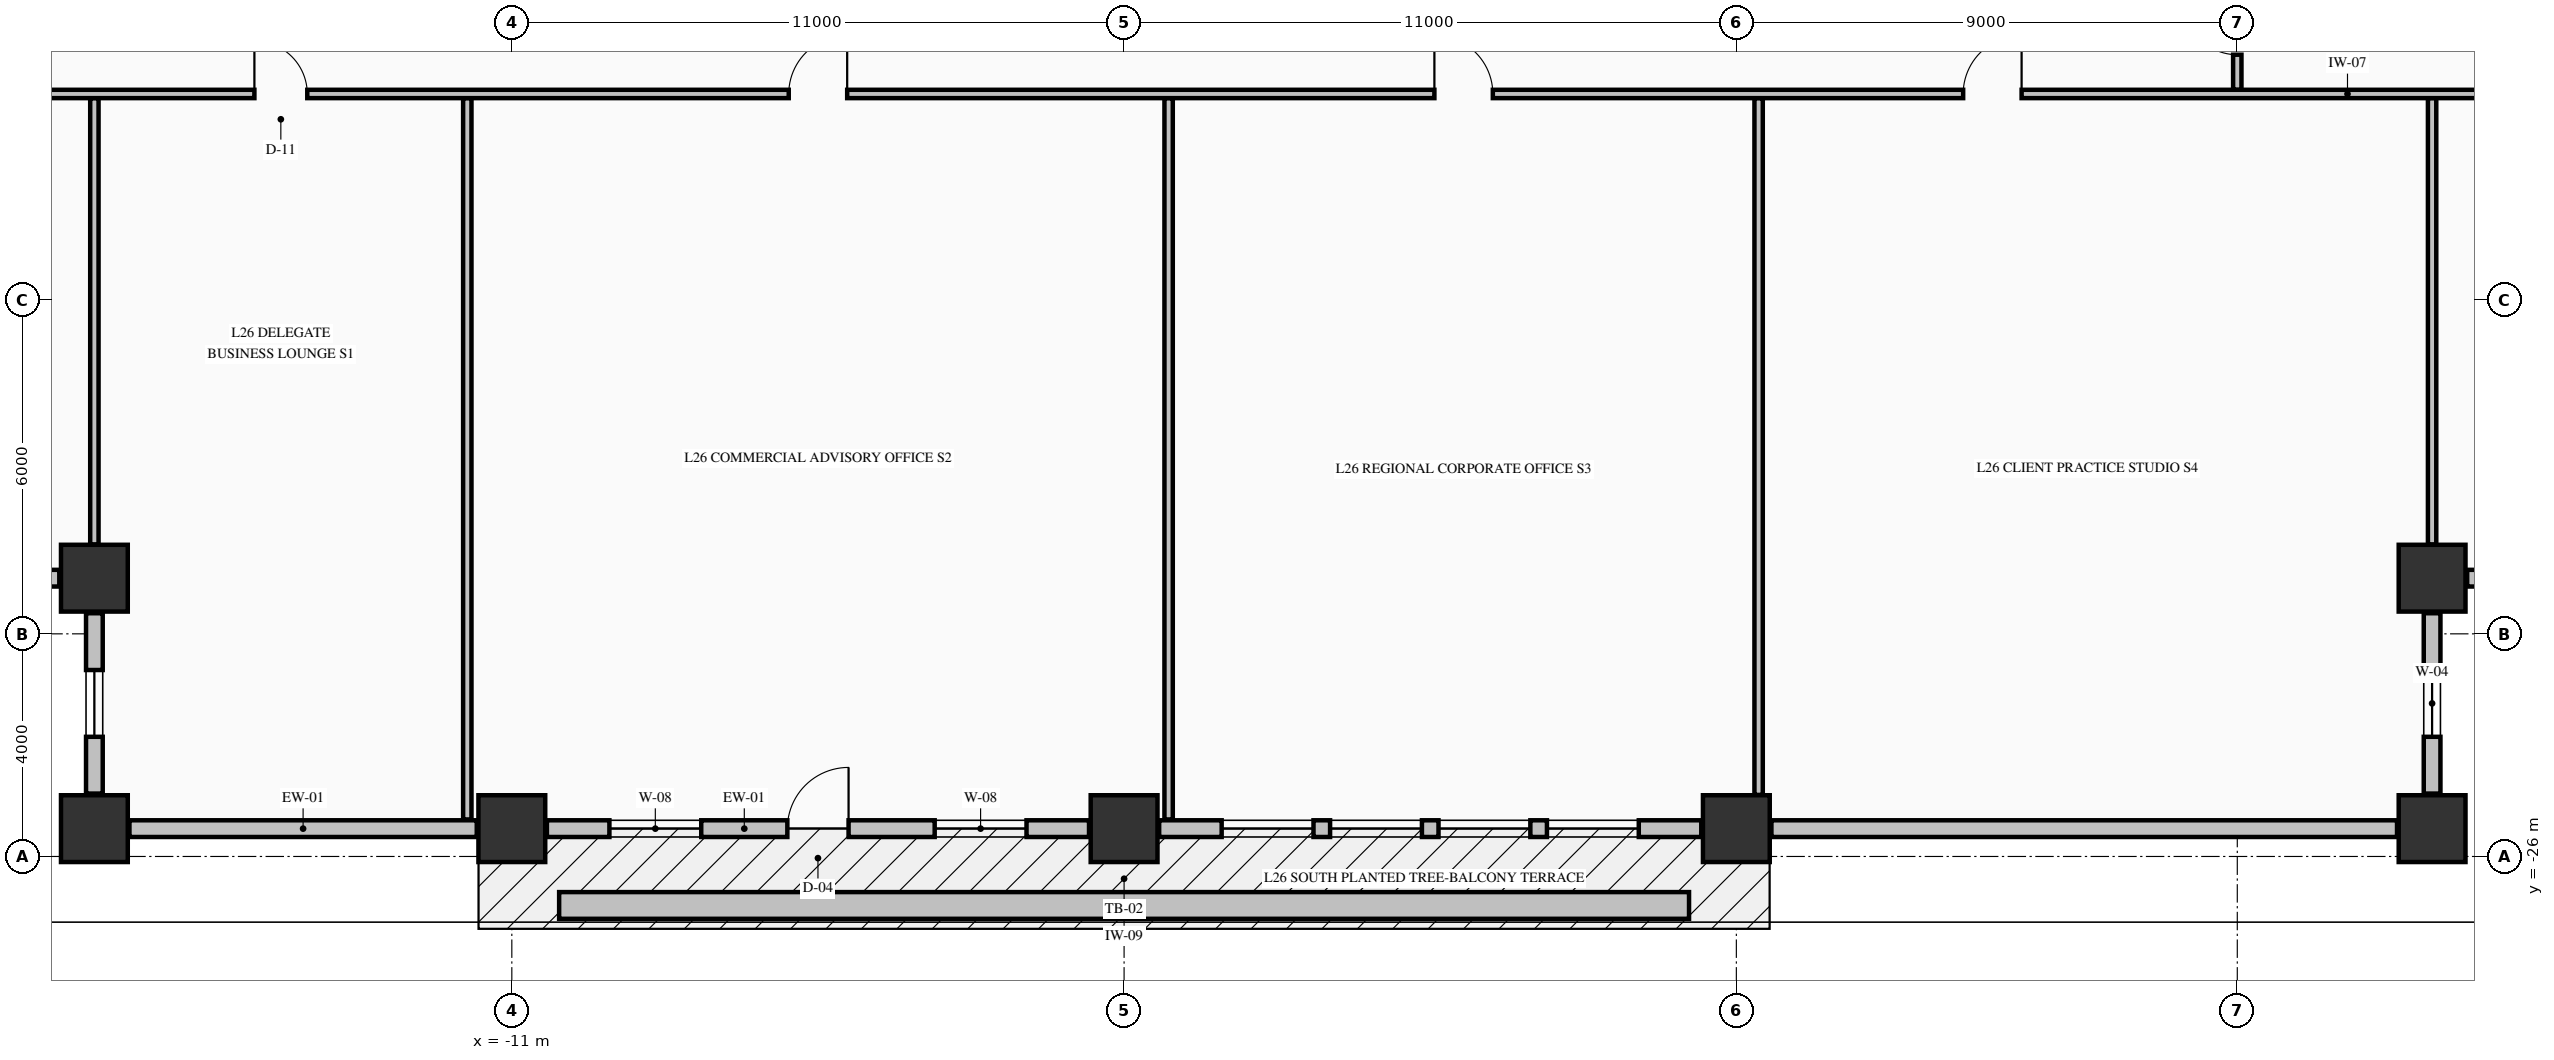
"""IFC4 building model, lengths in metres.
Left out: names, types, materials, properties, quantities, classifications, styles, units other than length and angle.
Written with IfcOpenShell. Run it as: python <this file> out.ifc"""

import sys

from ifc_helpers import new_model, si_unit, direction, frame, frame_2d, origin, origin_2d, place, context, subcontext, project, spatial, rectangle, extrude, element, fill, save


model = new_model("IFC4")
c1 = context("Model", 3, precision=1e-05, world=origin(), true_north=direction((0.0, 1.0)))
c2 = subcontext(c1, "Body", "Model", "MODEL_VIEW")
j1 = project(units=[si_unit("LENGTHUNIT", "METRE"), si_unit("PLANEANGLEUNIT", "RADIAN")], contexts=[c1])
p1 = place(None, origin())
s1 = spatial("IfcSite", under=j1, at=p1, CompositionType="ELEMENT")
p2 = place(p1, origin())
s2 = spatial("IfcBuilding", under=s1, at=p2, CompositionType="ELEMENT")
p3 = place(p2, frame((0.0, 0.0, 105.64)))
s3 = spatial("IfcBuildingStorey", under=s2, at=p3, CompositionType="ELEMENT", Elevation=105.64)
for number, where, z_axis, x_axis in (
    (1, (-18.5, -25.5, -0.25), (0.0, 0.0, 1.0), (1.0, 0.0, 0.0)),
    (2, (-11.0, -25.5, -0.25), (0.0, 0.0, 1.0), (1.0, 0.0, 0.0)),
    (3, (0.0, -25.5, -0.25), (0.0, 0.0, 1.0), (1.0, 0.0, 0.0)),
    (4, (11.0, -25.5, -0.25), (0.0, 0.0, 1.0), (1.0, 0.0, 0.0)),
    (5, (23.5, -25.5, -0.25), (0.0, 0.0, 1.0), (1.0, 0.0, 0.0)),
    (6, (-18.5, -21.0, -0.25), (0.0, 0.0, 1.0), (1.0, 0.0, 0.0)),
    (7, (23.5, -21.0, -0.25), (0.0, 0.0, 1.0), (1.0, 0.0, 0.0)),
):
    element("IfcColumn", number, at=place(p3, frame(where, z_axis=z_axis, x_axis=x_axis)), inside=s3, PredefinedType="COLUMN", context=c2, shape_type="SweptSolid", body=[
        extrude(rectangle(XDim=1.2, YDim=1.2, at=origin_2d()), origin(), (0.0, 0.0, 1.0), 3.57),
    ])
p4 = place(p3, frame((23.5, -24.87, 0.0), z_axis=(0.0, 0.0, 1.0), x_axis=(0.0, 1.0, 0.0)))
e8 = element("IfcWall", 8, at=p4, inside=s3, PredefinedType="STANDARD", context=c2, shape_type="SweptSolid", body=[
    extrude(rectangle(XDim=3.24, YDim=0.3, at=frame_2d((1.62, 0.0))), origin(), (0.0, 0.0, 1.0), 2.712),
])
p5 = place(p4, frame((1.02, 0.0, 0.82)))
e9 = element("IfcOpeningElement", 9, at=p5, cuts=e8, PredefinedType="OPENING", context=c2, shape_type="SweptSolid", body=[
    extrude(rectangle(XDim=1.2, YDim=1.65, at=frame_2d((0.6, 0.825))), frame((0.0, 0.16, 0.0), z_axis=(0.0, -1.0, 0.0), x_axis=(1.0, 0.0, 0.0)), (0.0, 0.0, 1.0), 0.32),
])
p6 = place(p3, frame((24.13, -21.0, 0.0), z_axis=(0.0, 0.0, 1.0), x_axis=(1.0, 0.0, 0.0)))
e10 = element("IfcWall", 10, at=p6, inside=s3, PredefinedType="STANDARD", context=c2, shape_type="SweptSolid", body=[
    extrude(rectangle(XDim=3.24, YDim=0.3, at=frame_2d((1.62, 0.0))), origin(), (0.0, 0.0, 1.0), 2.712),
])
p7 = place(p6, frame((1.02, 0.0, 0.82)))
e11 = element("IfcOpeningElement", 11, at=p7, cuts=e10, PredefinedType="OPENING", context=c2, shape_type="SweptSolid", body=[
    extrude(rectangle(XDim=1.2, YDim=1.65, at=frame_2d((0.6, 0.825))), frame((0.0, 0.16, 0.0), z_axis=(0.0, -1.0, 0.0), x_axis=(1.0, 0.0, 0.0)), (0.0, 0.0, 1.0), 0.32),
])
p8 = place(p3, frame((-22.37, -21.0, 0.0), z_axis=(0.0, 0.0, 1.0), x_axis=(1.0, 0.0, 0.0)))
e12 = element("IfcWall", 12, at=p8, inside=s3, PredefinedType="STANDARD", context=c2, shape_type="SweptSolid", body=[
    extrude(rectangle(XDim=3.24, YDim=0.3, at=frame_2d((1.62, 0.0))), origin(), (0.0, 0.0, 1.0), 2.712),
])
p9 = place(p8, frame((1.02, 0.0, 0.82)))
e13 = element("IfcOpeningElement", 13, at=p9, cuts=e12, PredefinedType="OPENING", context=c2, shape_type="SweptSolid", body=[
    extrude(rectangle(XDim=1.2, YDim=1.65, at=frame_2d((0.6, 0.825))), frame((0.0, 0.16, 0.0), z_axis=(0.0, -1.0, 0.0), x_axis=(1.0, 0.0, 0.0)), (0.0, 0.0, 1.0), 0.32),
])
p10 = place(p3, frame((-18.5, -21.63, 0.0), z_axis=(0.0, 0.0, 1.0), x_axis=(0.0, -1.0, 0.0)))
e14 = element("IfcWall", 14, at=p10, inside=s3, PredefinedType="STANDARD", context=c2, shape_type="SweptSolid", body=[
    extrude(rectangle(XDim=3.24, YDim=0.3, at=frame_2d((1.62, 0.0))), origin(), (0.0, 0.0, 1.0), 2.712),
])
p11 = place(p10, frame((1.02, 0.0, 0.82)))
e15 = element("IfcOpeningElement", 15, at=p11, cuts=e14, PredefinedType="OPENING", context=c2, shape_type="SweptSolid", body=[
    extrude(rectangle(XDim=1.2, YDim=1.65, at=frame_2d((0.6, 0.825))), frame((0.0, 0.16, 0.0), z_axis=(0.0, -1.0, 0.0), x_axis=(1.0, 0.0, 0.0)), (0.0, 0.0, 1.0), 0.32),
])
p12 = place(p3, frame((-17.87, -25.5, 0.0), z_axis=(0.0, 0.0, 1.0), x_axis=(1.0, 0.0, 0.0)))
e16 = element("IfcWall", 16, at=p12, inside=s3, PredefinedType="STANDARD", context=c2, shape_type="SweptSolid", body=[
    extrude(rectangle(XDim=6.24, YDim=0.3, at=frame_2d((3.12, 0.0))), origin(), (0.0, 0.0, 1.0), 2.712),
])
p13 = place(p3, frame((-10.37, -25.5, 0.0), z_axis=(0.0, 0.0, 1.0), x_axis=(1.0, 0.0, 0.0)))
e17 = element("IfcWall", 17, at=p13, inside=s3, PredefinedType="STANDARD", context=c2, shape_type="SweptSolid", body=[
    extrude(rectangle(XDim=9.74, YDim=0.3, at=frame_2d((4.87, 0.0))), origin(), (0.0, 0.0, 1.0), 2.712),
])
p14 = place(p13, frame((4.32, 0.0, 0.0)))
e18 = element("IfcOpeningElement", 18, at=p14, cuts=e17, PredefinedType="OPENING", context=c2, shape_type="SweptSolid", body=[
    extrude(rectangle(XDim=1.1, YDim=2.15, at=frame_2d((0.55, 1.075))), frame((0.0, 0.16, 0.0), z_axis=(0.0, -1.0, 0.0), x_axis=(1.0, 0.0, 0.0)), (0.0, 0.0, 1.0), 0.32),
])
p15 = place(p13, frame((1.123, 0.0, 0.8)))
e19 = element("IfcOpeningElement", 19, at=p15, cuts=e17, PredefinedType="OPENING", context=c2, shape_type="SweptSolid", body=[
    extrude(rectangle(XDim=1.65, YDim=1.7, at=frame_2d((0.825, 0.85))), frame((0.0, 0.16, 0.0), z_axis=(0.0, -1.0, 0.0), x_axis=(1.0, 0.0, 0.0)), (0.0, 0.0, 1.0), 0.32),
])
p16 = place(p13, frame((6.967, 0.0, 0.8)))
e20 = element("IfcOpeningElement", 20, at=p16, cuts=e17, PredefinedType="OPENING", context=c2, shape_type="SweptSolid", body=[
    extrude(rectangle(XDim=1.65, YDim=1.7, at=frame_2d((0.825, 0.85))), frame((0.0, 0.16, 0.0), z_axis=(0.0, -1.0, 0.0), x_axis=(1.0, 0.0, 0.0)), (0.0, 0.0, 1.0), 0.32),
])
p17 = place(p3, frame((0.63, -25.5, 0.0), z_axis=(0.0, 0.0, 1.0), x_axis=(1.0, 0.0, 0.0)))
e21 = element("IfcWall", 21, at=p17, inside=s3, PredefinedType="STANDARD", context=c2, shape_type="SweptSolid", body=[
    extrude(rectangle(XDim=9.74, YDim=0.3, at=frame_2d((4.87, 0.0))), origin(), (0.0, 0.0, 1.0), 2.712),
])
p18 = place(p17, frame((1.123, 0.0, 0.8)))
e22 = element("IfcOpeningElement", 22, at=p18, cuts=e21, PredefinedType="OPENING", context=c2, shape_type="SweptSolid", body=[
    extrude(rectangle(XDim=1.65, YDim=1.7, at=frame_2d((0.825, 0.85))), frame((0.0, 0.16, 0.0), z_axis=(0.0, -1.0, 0.0), x_axis=(1.0, 0.0, 0.0)), (0.0, 0.0, 1.0), 0.32),
])
p19 = place(p17, frame((3.071, 0.0, 0.8)))
e23 = element("IfcOpeningElement", 23, at=p19, cuts=e21, PredefinedType="OPENING", context=c2, shape_type="SweptSolid", body=[
    extrude(rectangle(XDim=1.65, YDim=1.7, at=frame_2d((0.825, 0.85))), frame((0.0, 0.16, 0.0), z_axis=(0.0, -1.0, 0.0), x_axis=(1.0, 0.0, 0.0)), (0.0, 0.0, 1.0), 0.32),
])
p20 = place(p17, frame((5.019, 0.0, 0.8)))
e24 = element("IfcOpeningElement", 24, at=p20, cuts=e21, PredefinedType="OPENING", context=c2, shape_type="SweptSolid", body=[
    extrude(rectangle(XDim=1.65, YDim=1.7, at=frame_2d((0.825, 0.85))), frame((0.0, 0.16, 0.0), z_axis=(0.0, -1.0, 0.0), x_axis=(1.0, 0.0, 0.0)), (0.0, 0.0, 1.0), 0.32),
])
p21 = place(p17, frame((6.967, 0.0, 0.8)))
e25 = element("IfcOpeningElement", 25, at=p21, cuts=e21, PredefinedType="OPENING", context=c2, shape_type="SweptSolid", body=[
    extrude(rectangle(XDim=1.65, YDim=1.7, at=frame_2d((0.825, 0.85))), frame((0.0, 0.16, 0.0), z_axis=(0.0, -1.0, 0.0), x_axis=(1.0, 0.0, 0.0)), (0.0, 0.0, 1.0), 0.32),
])
p22 = place(p3, frame((11.63, -25.5, 0.0), z_axis=(0.0, 0.0, 1.0), x_axis=(1.0, 0.0, 0.0)))
e26 = element("IfcWall", 26, at=p22, inside=s3, PredefinedType="STANDARD", context=c2, shape_type="SweptSolid", body=[
    extrude(rectangle(XDim=11.24, YDim=0.3, at=frame_2d((5.62, 0.0))), origin(), (0.0, 0.0, 1.0), 2.712),
])
p23 = place(p3, frame((-22.835, -12.3, 0.0), z_axis=(0.0, 0.0, 1.0), x_axis=(1.0, 0.0, 0.0)))
e27 = element("IfcWall", 27, at=p23, inside=s3, PredefinedType="PARTITIONING", context=c2, shape_type="SweptSolid", body=[
    extrude(rectangle(XDim=50.67, YDim=0.15, at=frame_2d((25.335, 0.0))), origin(), (0.0, 0.0, 1.0), 3.32),
])
p24 = place(p23, frame((7.21, 0.0, 0.0)))
e28 = element("IfcOpeningElement", 28, at=p24, cuts=e27, PredefinedType="OPENING", context=c2, shape_type="SweptSolid", body=[
    extrude(rectangle(XDim=0.95, YDim=2.15, at=frame_2d((0.475, 1.075))), frame((0.0, 0.085, 0.0), z_axis=(0.0, -1.0, 0.0), x_axis=(1.0, 0.0, 0.0)), (0.0, 0.0, 1.0), 0.17),
])
p25 = place(p23, frame((16.81, 0.0, 0.0)))
e29 = element("IfcOpeningElement", 29, at=p25, cuts=e27, PredefinedType="OPENING", context=c2, shape_type="SweptSolid", body=[
    extrude(rectangle(XDim=1.05, YDim=2.15, at=frame_2d((0.525, 1.075))), frame((0.0, 0.085, 0.0), z_axis=(0.0, -1.0, 0.0), x_axis=(1.0, 0.0, 0.0)), (0.0, 0.0, 1.0), 0.17),
])
p26 = place(p23, frame((28.41, 0.0, 0.0)))
e30 = element("IfcOpeningElement", 30, at=p26, cuts=e27, PredefinedType="OPENING", context=c2, shape_type="SweptSolid", body=[
    extrude(rectangle(XDim=1.05, YDim=2.15, at=frame_2d((0.525, 1.075))), frame((0.0, 0.085, 0.0), z_axis=(0.0, -1.0, 0.0), x_axis=(1.0, 0.0, 0.0)), (0.0, 0.0, 1.0), 0.17),
])
p27 = place(p23, frame((37.91, 0.0, 0.0)))
e31 = element("IfcOpeningElement", 31, at=p27, cuts=e27, PredefinedType="OPENING", context=c2, shape_type="SweptSolid", body=[
    extrude(rectangle(XDim=1.05, YDim=2.15, at=frame_2d((0.525, 1.075))), frame((0.0, 0.085, 0.0), z_axis=(0.0, -1.0, 0.0), x_axis=(1.0, 0.0, 0.0)), (0.0, 0.0, 1.0), 0.17),
])
p28 = place(p3, frame((-18.5, -20.394, 0.0), z_axis=(0.0, 0.0, 1.0), x_axis=(0.0, 1.0, 0.0)))
e32 = element("IfcWall", 32, at=p28, inside=s3, PredefinedType="PARTITIONING", context=c2, shape_type="SweptSolid", body=[
    extrude(rectangle(XDim=8.016, YDim=0.15, at=frame_2d((4.008, 0.0))), origin(), (0.0, 0.0, 1.0), 3.32),
])
for number, where, z_axis, x_axis in (
    (33, (-11.8, -25.335, 0.0), (0.0, 0.0, 1.0), (0.0, 1.0, 0.0)),
    (34, (0.8, -25.335, 0.0), (0.0, 0.0, 1.0), (0.0, 1.0, 0.0)),
):
    element("IfcWall", number, at=place(p3, frame(where, z_axis=z_axis, x_axis=x_axis)), inside=s3, PredefinedType="PARTITIONING", context=c2, shape_type="SweptSolid", body=[
        extrude(rectangle(XDim=12.957, YDim=0.15, at=frame_2d((6.479, 0.0))), origin(), (0.0, 0.0, 1.0), 3.32),
    ])
p29 = place(p3, frame((11.4, -24.894, 0.0), z_axis=(0.0, 0.0, 1.0), x_axis=(0.0, 1.0, 0.0)))
e35 = element("IfcWall", 35, at=p29, inside=s3, PredefinedType="PARTITIONING", context=c2, shape_type="SweptSolid", body=[
    extrude(rectangle(XDim=12.516, YDim=0.15, at=frame_2d((6.258, 0.0))), origin(), (0.0, 0.0, 1.0), 3.32),
])
p30 = place(p3, frame((20.0, -12.222, 0.0), z_axis=(0.0, 0.0, 1.0), x_axis=(0.0, 1.0, 0.0)))
e36 = element("IfcWall", 36, at=p30, inside=s3, PredefinedType="PARTITIONING", context=c2, shape_type="SweptSolid", body=[
    extrude(rectangle(XDim=1.766, YDim=0.15, at=frame_2d((0.883, 0.0))), origin(), (0.0, 0.0, 1.0), 2.81),
])
p31 = place(p30, frame((0.627, 0.0, 0.0)))
e37 = element("IfcOpeningElement", 37, at=p31, cuts=e36, PredefinedType="OPENING", context=c2, shape_type="SweptSolid", body=[
    extrude(rectangle(XDim=0.95, YDim=2.15, at=frame_2d((0.475, 1.075))), frame((0.0, 0.085, 0.0), z_axis=(0.0, -1.0, 0.0), x_axis=(1.0, 0.0, 0.0)), (0.0, 0.0, 1.0), 0.17),
])
p32 = place(p3, frame((23.5, -20.394, 0.0), z_axis=(0.0, 0.0, 1.0), x_axis=(0.0, 1.0, 0.0)))
e38 = element("IfcWall", 38, at=p32, inside=s3, PredefinedType="PARTITIONING", context=c2, shape_type="SweptSolid", body=[
    extrude(rectangle(XDim=8.016, YDim=0.15, at=frame_2d((4.008, 0.0))), origin(), (0.0, 0.0, 1.0), 3.32),
])
p33 = place(p3, frame((-10.15, -26.88, -0.04), z_axis=(0.0, 0.0, 1.0), x_axis=(1.0, 0.0, 0.0)))
e39 = element("IfcWall", 39, at=p33, inside=s3, PredefinedType="PARAPET", context=c2, shape_type="SweptSolid", body=[
    extrude(rectangle(XDim=20.3, YDim=0.48, at=frame_2d((10.15, 0.0))), origin(), (0.0, 0.0, 1.0), 0.52),
])
p34 = place(p5, origin())
e40 = element("IfcWindow", 40, at=p34, inside=s3, PartitioningType="SINGLE_PANEL", PredefinedType="WINDOW", context=c2, shape_type="SweptSolid", body=[
    extrude(rectangle(XDim=1.2, YDim=1.65, at=frame_2d((0.6, 0.825))), frame((0.0, 0.03, 0.0), z_axis=(0.0, -1.0, 0.0), x_axis=(1.0, 0.0, 0.0)), (0.0, 0.0, 1.0), 0.06),
])
fill(e9, e40)
p35 = place(p11, origin())
e41 = element("IfcWindow", 41, at=p35, inside=s3, PartitioningType="SINGLE_PANEL", PredefinedType="WINDOW", context=c2, shape_type="SweptSolid", body=[
    extrude(rectangle(XDim=1.2, YDim=1.65, at=frame_2d((0.6, 0.825))), frame((0.0, 0.03, 0.0), z_axis=(0.0, -1.0, 0.0), x_axis=(1.0, 0.0, 0.0)), (0.0, 0.0, 1.0), 0.06),
])
fill(e15, e41)
p36 = place(p14, origin())
e42 = element("IfcDoor", 42, at=p36, inside=s3, OperationType="SINGLE_SWING_RIGHT", PredefinedType="DOOR", context=c2, shape_type="SweptSolid", body=[
    extrude(rectangle(XDim=1.1, YDim=2.15, at=frame_2d((0.55, 1.075))), frame((0.0, 0.025, 0.0), z_axis=(0.0, -1.0, 0.0), x_axis=(1.0, 0.0, 0.0)), (0.0, 0.0, 1.0), 0.05),
])
fill(e18, e42)
p37 = place(p15, origin())
e43 = element("IfcWindow", 43, at=p37, inside=s3, PartitioningType="SINGLE_PANEL", PredefinedType="WINDOW", context=c2, shape_type="SweptSolid", body=[
    extrude(rectangle(XDim=1.65, YDim=1.7, at=frame_2d((0.825, 0.85))), frame((0.0, 0.03, 0.0), z_axis=(0.0, -1.0, 0.0), x_axis=(1.0, 0.0, 0.0)), (0.0, 0.0, 1.0), 0.06),
])
fill(e19, e43)
p38 = place(p16, origin())
e44 = element("IfcWindow", 44, at=p38, inside=s3, PartitioningType="SINGLE_PANEL", PredefinedType="WINDOW", context=c2, shape_type="SweptSolid", body=[
    extrude(rectangle(XDim=1.65, YDim=1.7, at=frame_2d((0.825, 0.85))), frame((0.0, 0.03, 0.0), z_axis=(0.0, -1.0, 0.0), x_axis=(1.0, 0.0, 0.0)), (0.0, 0.0, 1.0), 0.06),
])
fill(e20, e44)
p39 = place(p18, origin())
e45 = element("IfcWindow", 45, at=p39, inside=s3, PartitioningType="SINGLE_PANEL", PredefinedType="WINDOW", context=c2, shape_type="SweptSolid", body=[
    extrude(rectangle(XDim=1.65, YDim=1.7, at=frame_2d((0.825, 0.85))), frame((0.0, 0.03, 0.0), z_axis=(0.0, -1.0, 0.0), x_axis=(1.0, 0.0, 0.0)), (0.0, 0.0, 1.0), 0.06),
])
fill(e22, e45)
p40 = place(p19, origin())
e46 = element("IfcWindow", 46, at=p40, inside=s3, PartitioningType="SINGLE_PANEL", PredefinedType="WINDOW", context=c2, shape_type="SweptSolid", body=[
    extrude(rectangle(XDim=1.65, YDim=1.7, at=frame_2d((0.825, 0.85))), frame((0.0, 0.03, 0.0), z_axis=(0.0, -1.0, 0.0), x_axis=(1.0, 0.0, 0.0)), (0.0, 0.0, 1.0), 0.06),
])
fill(e23, e46)
p41 = place(p20, origin())
e47 = element("IfcWindow", 47, at=p41, inside=s3, PartitioningType="SINGLE_PANEL", PredefinedType="WINDOW", context=c2, shape_type="SweptSolid", body=[
    extrude(rectangle(XDim=1.65, YDim=1.7, at=frame_2d((0.825, 0.85))), frame((0.0, 0.03, 0.0), z_axis=(0.0, -1.0, 0.0), x_axis=(1.0, 0.0, 0.0)), (0.0, 0.0, 1.0), 0.06),
])
fill(e24, e47)
p42 = place(p21, origin())
e48 = element("IfcWindow", 48, at=p42, inside=s3, PartitioningType="SINGLE_PANEL", PredefinedType="WINDOW", context=c2, shape_type="SweptSolid", body=[
    extrude(rectangle(XDim=1.65, YDim=1.7, at=frame_2d((0.825, 0.85))), frame((0.0, 0.03, 0.0), z_axis=(0.0, -1.0, 0.0), x_axis=(1.0, 0.0, 0.0)), (0.0, 0.0, 1.0), 0.06),
])
fill(e25, e48)
p43 = place(p24, origin())
e49 = element("IfcDoor", 49, at=p43, inside=s3, OperationType="SINGLE_SWING_LEFT", PredefinedType="DOOR", context=c2, shape_type="SweptSolid", body=[
    extrude(rectangle(XDim=0.95, YDim=2.15, at=frame_2d((0.475, 1.075))), frame((0.0, 0.025, 0.0), z_axis=(0.0, -1.0, 0.0), x_axis=(1.0, 0.0, 0.0)), (0.0, 0.0, 1.0), 0.05),
])
fill(e28, e49)
p44 = place(p25, origin())
e50 = element("IfcDoor", 50, at=p44, inside=s3, OperationType="SINGLE_SWING_RIGHT", PredefinedType="DOOR", context=c2, shape_type="SweptSolid", body=[
    extrude(rectangle(XDim=1.05, YDim=2.15, at=frame_2d((0.525, 1.075))), frame((0.0, 0.025, 0.0), z_axis=(0.0, -1.0, 0.0), x_axis=(1.0, 0.0, 0.0)), (0.0, 0.0, 1.0), 0.05),
])
fill(e29, e50)
p45 = place(p26, origin())
e51 = element("IfcDoor", 51, at=p45, inside=s3, OperationType="SINGLE_SWING_LEFT", PredefinedType="DOOR", context=c2, shape_type="SweptSolid", body=[
    extrude(rectangle(XDim=1.05, YDim=2.15, at=frame_2d((0.525, 1.075))), frame((0.0, 0.025, 0.0), z_axis=(0.0, -1.0, 0.0), x_axis=(1.0, 0.0, 0.0)), (0.0, 0.0, 1.0), 0.05),
])
fill(e30, e51)
p46 = place(p27, origin())
e52 = element("IfcDoor", 52, at=p46, inside=s3, OperationType="SINGLE_SWING_RIGHT", PredefinedType="DOOR", context=c2, shape_type="SweptSolid", body=[
    extrude(rectangle(XDim=1.05, YDim=2.15, at=frame_2d((0.525, 1.075))), frame((0.0, 0.025, 0.0), z_axis=(0.0, -1.0, 0.0), x_axis=(1.0, 0.0, 0.0)), (0.0, 0.0, 1.0), 0.05),
])
fill(e31, e52)
p47 = place(p31, origin())
e53 = element("IfcDoor", 53, at=p47, inside=s3, OperationType="SINGLE_SWING_RIGHT", PredefinedType="DOOR", context=c2, shape_type="SweptSolid", body=[
    extrude(rectangle(XDim=0.95, YDim=2.15, at=frame_2d((0.475, 1.075))), frame((0.0, 0.025, 0.0), z_axis=(0.0, -1.0, 0.0), x_axis=(1.0, 0.0, 0.0)), (0.0, 0.0, 1.0), 0.05),
])
fill(e37, e53)
save(model, sys.argv[1])
